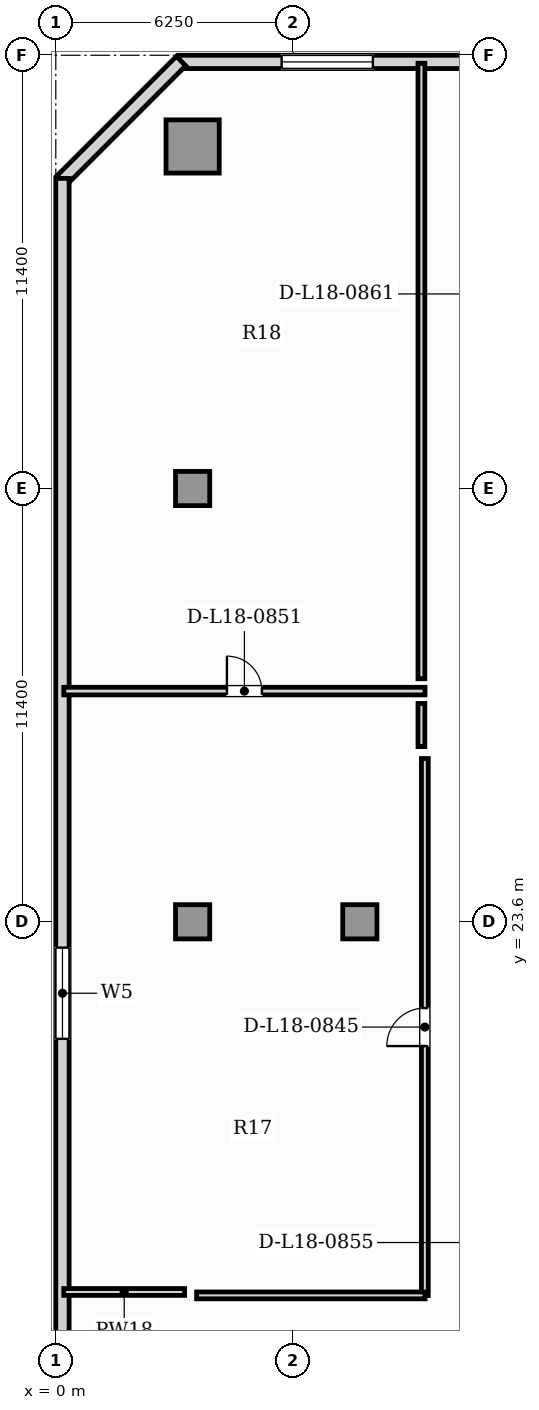
"""IFC4 building model, lengths in metres.
Left out: names, types, materials, properties, quantities, classifications, styles, units other than length and angle.
Written with IfcOpenShell. Run it as: python <this file> out.ifc"""

import sys

from ifc_helpers import new_model, si_unit, direction, frame, frame_2d, origin, origin_2d, place, context, subcontext, project, spatial, rectangle, hollow_rectangle, extrude, element, fill, save


model = new_model("IFC4")
c1 = context("Model", 3, precision=1e-05, world=origin(), true_north=direction((0.0, 1.0)))
c2 = subcontext(c1, "Body", "Model", "MODEL_VIEW")
j1 = project(units=[si_unit("LENGTHUNIT", "METRE"), si_unit("PLANEANGLEUNIT", "RADIAN")], contexts=[c1])
p1 = place(None, origin())
s1 = spatial("IfcSite", under=j1, at=p1, CompositionType="ELEMENT")
p2 = place(p1, origin())
s2 = spatial("IfcBuilding", under=s1, at=p2, CompositionType="ELEMENT")
p3 = place(p2, frame((0.0, 0.0, 76.0)))
s3 = spatial("IfcBuildingStorey", under=s2, at=p3, CompositionType="ELEMENT", Elevation=76.0)
p4 = place(p3, frame((3.6, 44.0, 0.0), z_axis=(0.0, 0.0, 1.0), x_axis=(1.0, 0.0, 0.0)))
e1 = element("IfcColumn", 1, at=p4, inside=s3, PredefinedType="USERDEFINED", context=c2, shape_type="SweptSolid", body=[
    extrude(hollow_rectangle(XDim=1.4, YDim=1.4, WallThickness=0.08, at=origin_2d()), origin(), (0.0, 0.0, 1.0), 5.05),
])
for number, where, z_axis, x_axis in (
    (2, (3.6, 23.6, 0.0), (0.0, 0.0, 1.0), (1.0, 0.0, 0.0)),
    (3, (8.0, 23.6, 0.0), (0.0, 0.0, 1.0), (1.0, 0.0, 0.0)),
    (4, (3.6, 35.0, 0.0), (0.0, 0.0, 1.0), (1.0, 0.0, 0.0)),
):
    element("IfcColumn", number, at=place(p3, frame(where, z_axis=z_axis, x_axis=x_axis)), inside=s3, PredefinedType="COLUMN", context=c2, shape_type="SweptSolid", body=[
        extrude(rectangle(XDim=0.9, YDim=0.9, at=origin_2d()), origin(), (0.0, 0.0, 1.0), 5.05),
    ])
p5 = place(p3, frame((21.71, 46.225, 0.0), z_axis=(0.0, 0.0, 1.0), x_axis=(-1.0, 0.0, 0.0)))
e5 = element("IfcWall", 5, at=p5, inside=s3, PredefinedType="SOLIDWALL", context=c2, shape_type="SweptSolid", body=[
    extrude(rectangle(XDim=18.47, YDim=0.35, at=frame_2d((9.235, 0.0))), origin(), (0.0, 0.0, 1.0), 4.8),
])
p6 = place(p5, frame((13.367, 0.0, 0.85)))
e6 = element("IfcOpeningElement", 6, at=p6, cuts=e5, PredefinedType="OPENING", context=c2, shape_type="SweptSolid", body=[
    extrude(rectangle(XDim=2.4, YDim=2.0, at=frame_2d((1.2, 1.0))), frame((0.0, 0.185, 0.0), z_axis=(0.0, -1.0, 0.0), x_axis=(1.0, 0.0, 0.0)), (0.0, 0.0, 1.0), 0.37),
])
p7 = place(p5, frame((7.102, 0.0, 0.88)))
e7 = element("IfcOpeningElement", 7, at=p7, cuts=e5, PredefinedType="OPENING", context=c2, shape_type="SweptSolid", body=[
    extrude(rectangle(XDim=1.65, YDim=2.0, at=frame_2d((0.825, 1.0))), frame((0.0, 0.185, 0.0), z_axis=(0.0, -1.0, 0.0), x_axis=(1.0, 0.0, 0.0)), (0.0, 0.0, 1.0), 0.37),
])
p8 = place(p5, frame((3.696, 0.0, 0.88)))
e8 = element("IfcOpeningElement", 8, at=p8, cuts=e5, PredefinedType="OPENING", context=c2, shape_type="SweptSolid", body=[
    extrude(rectangle(XDim=1.65, YDim=2.0, at=frame_2d((0.825, 1.0))), frame((0.0, 0.185, 0.0), z_axis=(0.0, -1.0, 0.0), x_axis=(1.0, 0.0, 0.0)), (0.0, 0.0, 1.0), 0.37),
])
p9 = place(p3, frame((3.295, 46.248, 0.0), z_axis=(0.0, 0.0, 1.0), x_axis=(-0.707079321262, -0.707134240044, 0.0)))
e9 = element("IfcWall", 9, at=p9, inside=s3, PredefinedType="SOLIDWALL", context=c2, shape_type="SweptSolid", body=[
    extrude(rectangle(XDim=4.446, YDim=0.35, at=frame_2d((2.223, 0.0))), origin(), (0.0, 0.0, 1.0), 4.8),
])
p10 = place(p3, frame((0.175, 43.16, 0.0), z_axis=(0.0, 0.0, 1.0), x_axis=(0.0, -1.0, 0.0)))
e10 = element("IfcWall", 10, at=p10, inside=s3, PredefinedType="SOLIDWALL", context=c2, shape_type="SweptSolid", body=[
    extrude(rectangle(XDim=39.92, YDim=0.35, at=frame_2d((19.96, 0.0))), origin(), (0.0, 0.0, 1.0), 4.8),
])
p11 = place(p10, frame((20.24, 0.0, 0.85)))
e11 = element("IfcOpeningElement", 11, at=p11, cuts=e10, PredefinedType="OPENING", context=c2, shape_type="SweptSolid", body=[
    extrude(rectangle(XDim=2.4, YDim=2.0, at=frame_2d((1.2, 1.0))), frame((0.0, 0.185, 0.0), z_axis=(0.0, -1.0, 0.0), x_axis=(1.0, 0.0, 0.0)), (0.0, 0.0, 1.0), 0.37),
])
p12 = place(p3, frame((9.71, 13.765, 0.0), z_axis=(0.0, 0.0, 1.0), x_axis=(0.0, 1.0, 0.0)))
e12 = element("IfcWall", 12, at=p12, inside=s3, PredefinedType="PARTITIONING", context=c2, shape_type="SweptSolid", body=[
    extrude(rectangle(XDim=14.13, YDim=0.18, at=frame_2d((7.065, 0.0))), origin(), (0.0, 0.0, 1.0), 4.8),
])
p13 = place(p12, frame((6.565, 0.0, 0.0)))
e13 = element("IfcOpeningElement", 13, at=p13, cuts=e12, PredefinedType="OPENING", context=c2, shape_type="SweptSolid", body=[
    extrude(rectangle(XDim=1.0, YDim=2.15, at=frame_2d((0.5, 1.075))), frame((0.0, 0.1, 0.0), z_axis=(0.0, -1.0, 0.0), x_axis=(1.0, 0.0, 0.0)), (0.0, 0.0, 1.0), 0.2),
])
p14 = place(p3, frame((3.705, 13.77, 0.0), z_axis=(0.0, 0.0, 1.0), x_axis=(1.0, 0.0, 0.0)))
e14 = element("IfcWall", 14, at=p14, inside=s3, PredefinedType="PARTITIONING", context=c2, shape_type="SweptSolid", body=[
    extrude(rectangle(XDim=6.01, YDim=0.18, at=frame_2d((3.005, 0.0))), origin(), (0.0, 0.0, 1.0), 4.8),
])
p15 = place(p3, frame((0.21, 29.67, 0.0), z_axis=(0.0, 0.0, 1.0), x_axis=(1.0, 0.0, 0.0)))
e15 = element("IfcWall", 15, at=p15, inside=s3, PredefinedType="PARTITIONING", context=c2, shape_type="SweptSolid", body=[
    extrude(rectangle(XDim=9.505, YDim=0.2, at=frame_2d((4.752, 0.0))), origin(), (0.0, 0.0, 1.0), 4.8),
])
p16 = place(p15, frame((4.292, 0.0, 0.0)))
e16 = element("IfcOpeningElement", 16, at=p16, cuts=e15, PredefinedType="OPENING", context=c2, shape_type="SweptSolid", body=[
    extrude(rectangle(XDim=0.92, YDim=2.1, at=frame_2d((0.46, 1.05))), frame((0.0, 0.11, 0.0), z_axis=(0.0, -1.0, 0.0), x_axis=(1.0, 0.0, 0.0)), (0.0, 0.0, 1.0), 0.22),
])
p17 = place(p3, frame((9.62, 29.345, 0.0), z_axis=(0.0, 0.0, 1.0), x_axis=(0.0, -1.0, 0.0)))
e17 = element("IfcWall", 17, at=p17, inside=s3, PredefinedType="PARTITIONING", context=c2, shape_type="SweptSolid", body=[
    extrude(rectangle(XDim=1.135, YDim=0.18, at=frame_2d((0.567, 0.0))), origin(), (0.0, 0.0, 1.0), 4.8),
])
p18 = place(p3, frame((3.39, 13.86, 0.0), z_axis=(0.0, 0.0, 1.0), x_axis=(-1.0, 0.0, 0.0)))
e18 = element("IfcWall", 18, at=p18, inside=s3, PredefinedType="PARTITIONING", context=c2, shape_type="SweptSolid", body=[
    extrude(rectangle(XDim=3.18, YDim=0.18, at=frame_2d((1.59, 0.0))), origin(), (0.0, 0.0, 1.0), 4.8),
])
p19 = place(p3, frame((9.62, 46.19, 0.0), z_axis=(0.0, 0.0, 1.0), x_axis=(0.0, -1.0, 0.0)))
e19 = element("IfcWall", 19, at=p19, inside=s3, PredefinedType="PARTITIONING", context=c2, shape_type="SweptSolid", body=[
    extrude(rectangle(XDim=16.195, YDim=0.18, at=frame_2d((8.097, 0.0))), origin(), (0.0, 0.0, 1.0), 4.8),
])
p20 = place(p11, origin())
e20 = element("IfcWindow", 20, at=p20, inside=s3, PartitioningType="SINGLE_PANEL", PredefinedType="WINDOW", context=c2, shape_type="SweptSolid", body=[
    extrude(rectangle(XDim=2.4, YDim=2.0, at=frame_2d((1.2, 1.0))), frame((0.0, 0.03, 0.0), z_axis=(0.0, -1.0, 0.0), x_axis=(1.0, 0.0, 0.0)), (0.0, 0.0, 1.0), 0.06),
])
fill(e11, e20)
p21 = place(p6, origin())
e21 = element("IfcWindow", 21, at=p21, inside=s3, PartitioningType="SINGLE_PANEL", PredefinedType="WINDOW", context=c2, shape_type="SweptSolid", body=[
    extrude(rectangle(XDim=2.4, YDim=2.0, at=frame_2d((1.2, 1.0))), frame((0.0, 0.03, 0.0), z_axis=(0.0, -1.0, 0.0), x_axis=(1.0, 0.0, 0.0)), (0.0, 0.0, 1.0), 0.06),
])
fill(e6, e21)
p22 = place(p13, origin())
e22 = element("IfcDoor", 22, at=p22, inside=s3, OperationType="SINGLE_SWING_LEFT", PredefinedType="DOOR", context=c2, shape_type="SweptSolid", body=[
    extrude(rectangle(XDim=1.0, YDim=2.15, at=frame_2d((0.5, 1.075))), frame((0.0, 0.025, 0.0), z_axis=(0.0, -1.0, 0.0), x_axis=(1.0, 0.0, 0.0)), (0.0, 0.0, 1.0), 0.05),
])
fill(e13, e22)
p23 = place(p16, origin())
e23 = element("IfcDoor", 23, at=p23, inside=s3, OperationType="SINGLE_SWING_LEFT", PredefinedType="DOOR", context=c2, shape_type="SweptSolid", body=[
    extrude(rectangle(XDim=0.92, YDim=2.1, at=frame_2d((0.46, 1.05))), frame((0.0, 0.025, 0.0), z_axis=(0.0, -1.0, 0.0), x_axis=(1.0, 0.0, 0.0)), (0.0, 0.0, 1.0), 0.05),
])
fill(e16, e23)
save(model, sys.argv[1])
